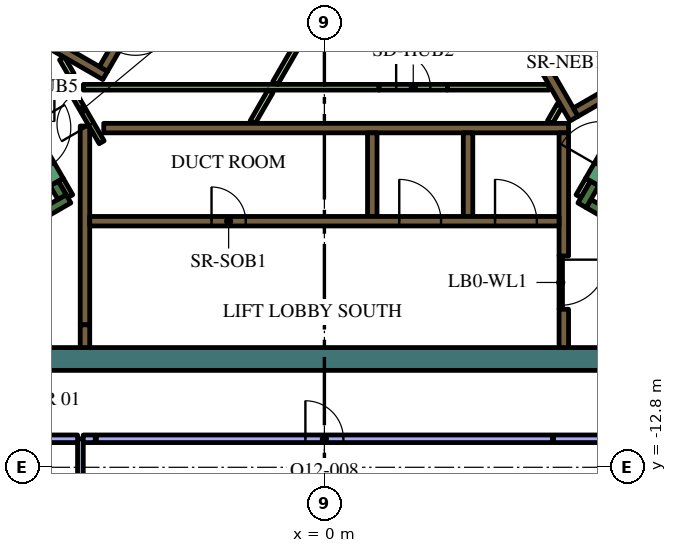
"""IFC4 building model, lengths in metres.
Left out: names, types, materials, properties, quantities, classifications, styles, units other than length and angle.
Written with IfcOpenShell. Run it as: python <this file> out.ifc"""

import sys

from ifc_helpers import new_model, si_unit, direction, frame, frame_2d, origin, place, context, subcontext, project, spatial, polyline, rectangle, outline, extrude, element, fill, save


model = new_model("IFC4")
c1 = context("Model", 3, precision=1e-05, world=origin(), true_north=direction((0.0, 1.0)))
c2 = subcontext(c1, "Body", "Model", "MODEL_VIEW")
j1 = project(units=[si_unit("LENGTHUNIT", "METRE"), si_unit("PLANEANGLEUNIT", "RADIAN")], contexts=[c1])
p1 = place(None, origin())
s1 = spatial("IfcSite", under=j1, at=p1, CompositionType="ELEMENT")
p2 = place(p1, origin())
s2 = spatial("IfcBuilding", under=s1, at=p2, CompositionType="ELEMENT")
p3 = place(p2, frame((0.0, 0.0, 288.0)))
s3 = spatial("IfcBuildingStorey", under=s2, at=p3, CompositionType="ELEMENT", Elevation=288.0)
p4 = place(p3, origin())
e1 = element("IfcWall", 1, at=p4, inside=s3, PredefinedType="SOLIDWALL", context=c2, shape_type="SweptSolid", body=[
    extrude(outline(polyline([(-15.502, -6.35), (-4.912, 11.992), (-4.393, 11.692), (-10.815, 0.569), (-10.84, 0.583), (-10.84, 0.583), (-10.84, 0.583), (-10.965, 0.367), (-10.965, 0.367), (-10.965, 0.367), (-10.94, 0.352), (-11.033, 0.191), (-14.809, -6.35), (-15.156, -6.95), (-15.502, -6.35)])), origin(), (0.0, 0.0, 1.0), 4.2),
])
p5 = place(p3, frame((-10.556, -9.95, 0.0), z_axis=(0.0, 0.0, 1.0), x_axis=(1.0, 0.0, 0.0)))
e2 = element("IfcWall", 2, at=p5, inside=s3, PredefinedType="SOLIDWALL", context=c2, shape_type="SweptSolid", body=[
    extrude(rectangle(XDim=19.461, YDim=0.6, at=frame_2d((9.73, 0.0))), origin(), (0.0, 0.0, 1.0), 4.2),
])
p6 = place(p3, frame((12.84, -9.261, 0.0), z_axis=(0.0, 0.0, 1.0), x_axis=(-0.866013990052, 0.500019768644, 0.0)))
e3 = element("IfcWall", 3, at=p6, inside=s3, PredefinedType="SOLIDWALL", context=c2, shape_type="SweptSolid", body=[
    extrude(rectangle(XDim=6.8, YDim=0.25, at=frame_2d((3.4, 0.0))), origin(), (0.0, 0.0, 1.0), 4.2),
])
p7 = place(p3, frame((7.113, -5.33, 0.0), z_axis=(0.0, 0.0, 1.0), x_axis=(-0.499965889992, -0.866045096311, 0.0)))
e4 = element("IfcWall", 4, at=p7, inside=s3, PredefinedType="SOLIDWALL", context=c2, shape_type="SweptSolid", body=[
    extrude(rectangle(XDim=0.666, YDim=0.25, at=frame_2d((0.333, 0.0))), origin(), (0.0, 0.0, 1.0), 4.2),
])
p8 = place(p3, frame((-12.84, -9.261, 0.0), z_axis=(0.0, 0.0, 1.0), x_axis=(0.866016039709, 0.500016218704, 0.0)))
e5 = element("IfcWall", 5, at=p8, inside=s3, PredefinedType="SOLIDWALL", context=c2, shape_type="SweptSolid", body=[
    extrude(rectangle(XDim=7.05, YDim=0.25, at=frame_2d((3.525, 0.0))), origin(), (0.0, 0.0, 1.0), 4.2),
])
p9 = place(p3, frame((-6.905, -5.69, 0.0), z_axis=(0.0, 0.0, 1.0), x_axis=(-0.499993700073, 0.866029041019, 0.0)))
e6 = element("IfcWall", 6, at=p9, inside=s3, PredefinedType="SOLIDWALL", context=c2, shape_type="SweptSolid", body=[
    extrude(rectangle(XDim=0.416, YDim=0.25, at=frame_2d((0.208, 0.0))), origin(), (0.0, 0.0, 1.0), 4.2),
])
p10 = place(p3, frame((-5.806, -3.875, 0.0), z_axis=(0.0, 0.0, 1.0), x_axis=(1.0, 0.0, 0.0)))
e7 = element("IfcWall", 7, at=p10, inside=s3, PredefinedType="SOLIDWALL", context=c2, shape_type="SweptSolid", body=[
    extrude(rectangle(XDim=12.231, YDim=0.25, at=frame_2d((6.116, 0.0))), origin(), (0.0, 0.0, 1.0), 4.2),
])
p11 = place(p3, frame((6.3, -7.24, 0.0), z_axis=(0.0, 0.0, 1.0), x_axis=(0.0, 1.0, 0.0)))
e8 = element("IfcWall", 8, at=p11, inside=s3, PredefinedType="SOLIDWALL", context=c2, shape_type="SweptSolid", body=[
    extrude(rectangle(XDim=3.24, YDim=0.25, at=frame_2d((1.62, 0.0))), origin(), (0.0, 0.0, 1.0), 4.2),
])
p12 = place(p3, frame((6.3, -9.65, 0.0), z_axis=(0.0, 0.0, 1.0), x_axis=(0.0, 1.0, 0.0)))
e9 = element("IfcWall", 9, at=p12, inside=s3, PredefinedType="SOLIDWALL", context=c2, shape_type="SweptSolid", body=[
    extrude(rectangle(XDim=1.008, YDim=0.25, at=frame_2d((0.504, 0.0))), origin(), (0.0, 0.0, 1.0), 4.2),
])
for number, where, z_axis, x_axis in (
    (10, (3.78, -4.0, 0.0), (0.0, 0.0, 1.0), (0.0, -1.0, 0.0)),
    (11, (1.26, -4.0, 0.0), (0.0, 0.0, 1.0), (0.0, -1.0, 0.0)),
):
    element("IfcWall", number, at=place(p3, frame(where, z_axis=z_axis, x_axis=x_axis)), inside=s3, PredefinedType="SOLIDWALL", context=c2, shape_type="SweptSolid", body=[
        extrude(rectangle(XDim=2.2, YDim=0.25, at=frame_2d((1.1, 0.0))), origin(), (0.0, 0.0, 1.0), 4.2),
    ])
p13 = place(p3, frame((-6.3, -9.05, 0.0), z_axis=(0.0, 0.0, 1.0), x_axis=(0.0, 1.0, 0.0)))
e12 = element("IfcWall", 12, at=p13, inside=s3, PredefinedType="SOLIDWALL", context=c2, shape_type="SweptSolid", body=[
    extrude(rectangle(XDim=5.23, YDim=0.25, at=frame_2d((2.615, 0.0))), origin(), (0.0, 0.0, 1.0), 4.2),
])
p14 = place(p3, frame((-6.3, -9.052, 0.0), z_axis=(0.0, 0.0, 1.0), x_axis=(0.0, -1.0, 0.0)))
e13 = element("IfcWall", 13, at=p14, inside=s3, PredefinedType="SOLIDWALL", context=c2, shape_type="SweptSolid", body=[
    extrude(rectangle(XDim=0.598, YDim=0.25, at=frame_2d((0.299, 0.0))), origin(), (0.0, 0.0, 1.0), 4.2),
])
e14 = element("IfcWall", 14, at=p4, inside=s3, PredefinedType="SOLIDWALL", context=c2, shape_type="SweptSolid", body=[
    extrude(outline(polyline([(0.332, 6.925), (0.335, 6.925), (0.335, 6.925), (0.335, 6.925), (0.335, 7.075), (0.335, 7.075), (0.335, 7.075), (0.245, 7.075), (0.035, 7.439), (0.252, 7.564), (0.377, 7.348), (1.512, 5.382), (1.637, 5.165), (2.221, 4.153), (2.771, 3.199), (2.896, 2.983), (3.138, 2.564), (4.031, 1.017), (4.156, 0.801), (5.292, -1.165), (5.417, -1.382), (6.073, -2.519), (6.552, -3.348), (6.677, -3.564), (6.46, -3.689), (0.332, 6.925)])), origin(), (0.0, 0.0, 1.0), 4.2),
])
p15 = place(p3, frame((11.507, -0.631, 0.0), z_axis=(0.0, 0.0, 1.0), x_axis=(-0.866011447264, -0.500024172624, 0.0)))
e15 = element("IfcWall", 15, at=p15, inside=s3, PredefinedType="SOLIDWALL", context=c2, shape_type="SweptSolid", body=[
    extrude(rectangle(XDim=5.65, YDim=0.25, at=frame_2d((2.825, 0.0))), origin(), (0.0, 0.0, 1.0), 4.2),
])
p16 = place(p3, frame((-7.889, -1.265, 0.0), z_axis=(0.0, 0.0, 1.0), x_axis=(0.866057815567, -0.499943856944, 0.0)))
e16 = element("IfcWall", 16, at=p16, inside=s3, PredefinedType="SOLIDWALL", context=c2, shape_type="SweptSolid", body=[
    extrude(rectangle(XDim=2.45, YDim=0.25, at=frame_2d((1.225, 0.0))), origin(), (0.0, 0.0, 1.0), 4.2),
])
p17 = place(p3, frame((1.438, -2.8, 0.0), z_axis=(0.0, 0.0, 1.0), x_axis=(-1.0, 0.0, 0.0)))
e17 = element("IfcWall", 17, at=p17, inside=s3, PredefinedType="PARTITIONING", context=c2, shape_type="SweptSolid", body=[
    extrude(rectangle(XDim=7.781, YDim=0.15, at=frame_2d((3.891, 0.0))), origin(), (0.0, 0.0, 1.0), 3.55),
])
p18 = place(p3, frame((-1.418, -2.907, 0.0), z_axis=(0.0, 0.0, 1.0), x_axis=(-0.499978056798, -0.866038072327, 0.0)))
e18 = element("IfcWall", 18, at=p18, inside=s3, PredefinedType="PARTITIONING", context=c2, shape_type="SweptSolid", body=[
    extrude(rectangle(XDim=0.937, YDim=0.15, at=frame_2d((0.469, 0.0))), origin(), (0.0, 0.0, 1.0), 3.55),
])
for number, where, z_axis, x_axis in (
    (19, (-1.295, -2.693, 0.0), (0.0, 0.0, 1.0), (0.5, 0.866, 0.0)),
    (20, (3.238, -2.8, 0.0), (0.0, 0.0, 1.0), (1.0, 0.0, 0.0)),
):
    element("IfcWall", number, at=place(p3, frame(where, z_axis=z_axis, x_axis=x_axis)), inside=s3, PredefinedType="PARTITIONING", context=c2, shape_type="SweptSolid", body=[
        extrude(rectangle(XDim=2.672, YDim=0.15, at=frame_2d((1.336, 0.0))), origin(), (0.0, 0.0, 1.0), 3.55),
    ])
p19 = place(p3, frame((-6.653, -2.477, 0.0), z_axis=(0.0, 0.0, 1.0), x_axis=(-0.500002592159, 0.866023907196, 0.0)))
e21 = element("IfcWall", 21, at=p19, inside=s3, PredefinedType="PARTITIONING", context=c2, shape_type="SweptSolid", body=[
    extrude(rectangle(XDim=0.503, YDim=0.15, at=frame_2d((0.251, 0.0))), origin(), (0.0, 0.0, 1.0), 3.55),
])
p20 = place(p3, frame((-6.94, -5.23, 0.0), z_axis=(0.0, 0.0, 1.0), x_axis=(0.499834152157, -0.86612113491, 0.0)))
e22 = element("IfcWall", 22, at=p20, inside=s3, PredefinedType="PARTITIONING", context=c2, shape_type="SweptSolid", body=[
    extrude(rectangle(XDim=0.505, YDim=0.15, at=frame_2d((0.252, 0.0))), origin(), (0.0, 0.0, 1.0), 4.2),
])
p21 = place(p3, frame((6.688, -5.667, 0.0), z_axis=(0.0, 0.0, 1.0), x_axis=(0.499834152157, 0.86612113491, 0.0)))
e23 = element("IfcWall", 23, at=p21, inside=s3, PredefinedType="PARTITIONING", context=c2, shape_type="SweptSolid", body=[
    extrude(rectangle(XDim=0.505, YDim=0.15, at=frame_2d((0.252, 0.0))), origin(), (0.0, 0.0, 1.0), 3.55),
])
p22 = place(p3, frame((5.936, -3.718, 0.0), z_axis=(0.0, 0.0, 1.0), x_axis=(0.499890179513, 0.866088799389, 0.0)))
e24 = element("IfcWall", 24, at=p22, inside=s3, PredefinedType="PARTITIONING", context=c2, shape_type="SweptSolid", body=[
    extrude(rectangle(XDim=0.504, YDim=0.15, at=frame_2d((0.252, 0.0))), origin(), (0.0, 0.0, 1.0), 3.55),
])
p23 = place(p3, frame((-6.175, -6.325, 0.0), z_axis=(0.0, 0.0, 1.0), x_axis=(1.0, 0.0, 0.0)))
e25 = element("IfcWall", 25, at=p23, inside=s3, PredefinedType="SOLIDWALL", context=c2, shape_type="SweptSolid", body=[
    extrude(rectangle(XDim=12.35, YDim=0.25, at=frame_2d((6.175, 0.0))), origin(), (0.0, 0.0, 1.0), 4.2),
])
p24 = place(p23, frame((3.205, 0.0, 0.0)))
e26 = element("IfcOpeningElement", 26, at=p24, cuts=e25, PredefinedType="OPENING", context=c2, shape_type="SweptSolid", body=[
    extrude(rectangle(XDim=0.9, YDim=2.1, at=frame_2d((0.45, 1.05))), frame((0.0, 0.135, 0.0), z_axis=(0.0, -1.0, 0.0), x_axis=(1.0, 0.0, 0.0)), (0.0, 0.0, 1.0), 0.27),
])
p25 = place(p23, frame((8.145, 0.0, 0.0)))
e27 = element("IfcOpeningElement", 27, at=p25, cuts=e25, PredefinedType="OPENING", context=c2, shape_type="SweptSolid", body=[
    extrude(rectangle(XDim=1.1, YDim=2.1, at=frame_2d((0.55, 1.05))), frame((0.0, 0.135, 0.0), z_axis=(0.0, -1.0, 0.0), x_axis=(1.0, 0.0, 0.0)), (0.0, 0.0, 1.0), 0.27),
])
p26 = place(p23, frame((10.665, 0.0, 0.0)))
e28 = element("IfcOpeningElement", 28, at=p26, cuts=e25, PredefinedType="OPENING", context=c2, shape_type="SweptSolid", body=[
    extrude(rectangle(XDim=1.1, YDim=2.1, at=frame_2d((0.55, 1.05))), frame((0.0, 0.135, 0.0), z_axis=(0.0, -1.0, 0.0), x_axis=(1.0, 0.0, 0.0)), (0.0, 0.0, 1.0), 0.27),
])
p27 = place(p3, frame((8.565, -2.185, 0.0), z_axis=(0.0, 0.0, 1.0), x_axis=(-0.499997954832, 0.866026584559, 0.0)))
e29 = element("IfcWall", 29, at=p27, inside=s3, PredefinedType="SOLIDWALL", context=c2, shape_type="SweptSolid", body=[
    extrude(rectangle(XDim=12.35, YDim=0.25, at=frame_2d((6.175, 0.0))), origin(), (0.0, 0.0, 1.0), 4.2),
])
p28 = place(p27, frame((0.685, 0.0, 0.0)))
e30 = element("IfcOpeningElement", 30, at=p28, cuts=e29, PredefinedType="OPENING", context=c2, shape_type="SweptSolid", body=[
    extrude(rectangle(XDim=0.9, YDim=2.1, at=frame_2d((0.45, 1.05))), frame((0.0, 0.135, 0.0), z_axis=(0.0, -1.0, 0.0), x_axis=(1.0, 0.0, 0.0)), (0.0, 0.0, 1.0), 0.27),
])
p29 = place(p27, frame((3.105, 0.0, 0.0)))
e31 = element("IfcOpeningElement", 31, at=p29, cuts=e29, PredefinedType="OPENING", context=c2, shape_type="SweptSolid", body=[
    extrude(rectangle(XDim=1.1, YDim=2.1, at=frame_2d((0.55, 1.05))), frame((0.0, 0.135, 0.0), z_axis=(0.0, -1.0, 0.0), x_axis=(1.0, 0.0, 0.0)), (0.0, 0.0, 1.0), 0.27),
])
p30 = place(p27, frame((5.625, 0.0, 0.0)))
e32 = element("IfcOpeningElement", 32, at=p30, cuts=e29, PredefinedType="OPENING", context=c2, shape_type="SweptSolid", body=[
    extrude(rectangle(XDim=1.1, YDim=2.1, at=frame_2d((0.55, 1.05))), frame((0.0, 0.135, 0.0), z_axis=(0.0, -1.0, 0.0), x_axis=(1.0, 0.0, 0.0)), (0.0, 0.0, 1.0), 0.27),
])
p31 = place(p27, frame((8.145, 0.0, 0.0)))
e33 = element("IfcOpeningElement", 33, at=p31, cuts=e29, PredefinedType="OPENING", context=c2, shape_type="SweptSolid", body=[
    extrude(rectangle(XDim=1.1, YDim=2.1, at=frame_2d((0.55, 1.05))), frame((0.0, 0.135, 0.0), z_axis=(0.0, -1.0, 0.0), x_axis=(1.0, 0.0, 0.0)), (0.0, 0.0, 1.0), 0.27),
])
p32 = place(p27, frame((10.665, 0.0, 0.0)))
e34 = element("IfcOpeningElement", 34, at=p32, cuts=e29, PredefinedType="OPENING", context=c2, shape_type="SweptSolid", body=[
    extrude(rectangle(XDim=1.1, YDim=2.1, at=frame_2d((0.55, 1.05))), frame((0.0, 0.135, 0.0), z_axis=(0.0, -1.0, 0.0), x_axis=(1.0, 0.0, 0.0)), (0.0, 0.0, 1.0), 0.27),
])
p33 = place(p3, frame((-0.898, 6.194, 0.0), z_axis=(0.0, 0.0, 1.0), x_axis=(-0.499996202215, -0.866027596426, 0.0)))
e35 = element("IfcWall", 35, at=p33, inside=s3, PredefinedType="SOLIDWALL", context=c2, shape_type="SweptSolid", body=[
    extrude(rectangle(XDim=9.83, YDim=0.25, at=frame_2d((4.915, 0.0))), origin(), (0.0, 0.0, 1.0), 4.2),
])
p34 = place(p33, frame((0.585, 0.0, 0.0)))
e36 = element("IfcOpeningElement", 36, at=p34, cuts=e35, PredefinedType="OPENING", context=c2, shape_type="SweptSolid", body=[
    extrude(rectangle(XDim=1.1, YDim=2.1, at=frame_2d((0.55, 1.05))), frame((0.0, 0.135, 0.0), z_axis=(0.0, -1.0, 0.0), x_axis=(1.0, 0.0, 0.0)), (0.0, 0.0, 1.0), 0.27),
])
p35 = place(p33, frame((3.105, 0.0, 0.0)))
e37 = element("IfcOpeningElement", 37, at=p35, cuts=e35, PredefinedType="OPENING", context=c2, shape_type="SweptSolid", body=[
    extrude(rectangle(XDim=1.1, YDim=2.1, at=frame_2d((0.55, 1.05))), frame((0.0, 0.135, 0.0), z_axis=(0.0, -1.0, 0.0), x_axis=(1.0, 0.0, 0.0)), (0.0, 0.0, 1.0), 0.27),
])
p36 = place(p33, frame((5.625, 0.0, 0.0)))
e38 = element("IfcOpeningElement", 38, at=p36, cuts=e35, PredefinedType="OPENING", context=c2, shape_type="SweptSolid", body=[
    extrude(rectangle(XDim=1.1, YDim=2.1, at=frame_2d((0.55, 1.05))), frame((0.0, 0.135, 0.0), z_axis=(0.0, -1.0, 0.0), x_axis=(1.0, 0.0, 0.0)), (0.0, 0.0, 1.0), 0.27),
])
p37 = place(p33, frame((8.145, 0.0, 0.0)))
e39 = element("IfcOpeningElement", 39, at=p37, cuts=e35, PredefinedType="OPENING", context=c2, shape_type="SweptSolid", body=[
    extrude(rectangle(XDim=1.1, YDim=2.1, at=frame_2d((0.55, 1.05))), frame((0.0, 0.135, 0.0), z_axis=(0.0, -1.0, 0.0), x_axis=(1.0, 0.0, 0.0)), (0.0, 0.0, 1.0), 0.27),
])
p38 = place(p3, frame((7.048, -5.292, 0.0), z_axis=(0.0, 0.0, 1.0), x_axis=(0.49994051562, 0.866059744384, 0.0)))
e40 = element("IfcWall", 40, at=p38, inside=s3, PredefinedType="SOLIDWALL", context=c2, shape_type="SweptSolid", body=[
    extrude(rectangle(XDim=2.1, YDim=0.4, at=frame_2d((1.05, 0.0))), origin(), (0.0, 0.0, 1.0), 4.2),
])
p39 = place(p38, frame((0.45, 0.0, 0.0)))
e41 = element("IfcOpeningElement", 41, at=p39, cuts=e40, PredefinedType="OPENING", context=c2, shape_type="SweptSolid", body=[
    extrude(rectangle(XDim=1.2, YDim=2.1, at=frame_2d((0.6, 1.05))), frame((0.0, 0.21, 0.0), z_axis=(0.0, -1.0, 0.0), x_axis=(1.0, 0.0, 0.0)), (0.0, 0.0, 1.0), 0.42),
])
p40 = place(p3, frame((-8.098, -3.474, 0.0), z_axis=(0.0, 0.0, 1.0), x_axis=(0.49994051562, -0.866059744384, 0.0)))
e42 = element("IfcWall", 42, at=p40, inside=s3, PredefinedType="SOLIDWALL", context=c2, shape_type="SweptSolid", body=[
    extrude(rectangle(XDim=2.1, YDim=0.4, at=frame_2d((1.05, 0.0))), origin(), (0.0, 0.0, 1.0), 4.2),
])
p41 = place(p40, frame((0.45, 0.0, 0.0)))
e43 = element("IfcOpeningElement", 43, at=p41, cuts=e42, PredefinedType="OPENING", context=c2, shape_type="SweptSolid", body=[
    extrude(rectangle(XDim=1.2, YDim=2.1, at=frame_2d((0.6, 1.05))), frame((0.0, 0.21, 0.0), z_axis=(0.0, -1.0, 0.0), x_axis=(1.0, 0.0, 0.0)), (0.0, 0.0, 1.0), 0.42),
])
p42 = place(p3, frame((-5.861, -4.248, 0.0), z_axis=(0.0, 0.0, 1.0), x_axis=(-0.500043646338, 0.866000203093, 0.0)))
e44 = element("IfcWall", 44, at=p42, inside=s3, PredefinedType="PARTITIONING", context=c2, shape_type="SweptSolid", body=[
    extrude(rectangle(XDim=1.93, YDim=0.15, at=frame_2d((0.965, 0.0))), origin(), (0.0, 0.0, 1.0), 4.2),
])
p43 = place(p42, frame((0.55, 0.0, 0.0)))
e45 = element("IfcOpeningElement", 45, at=p43, cuts=e44, PredefinedType="OPENING", context=c2, shape_type="SweptSolid", body=[
    extrude(rectangle(XDim=0.9, YDim=2.1, at=frame_2d((0.45, 1.05))), frame((0.0, 0.085, 0.0), z_axis=(0.0, -1.0, 0.0), x_axis=(1.0, 0.0, 0.0)), (0.0, 0.0, 1.0), 0.17),
])
p44 = place(p3, frame((6.22, -7.237, 0.0), z_axis=(0.0, 0.0, 1.0), x_axis=(0.0, -1.0, 0.0)))
e46 = element("IfcWall", 46, at=p44, inside=s3, PredefinedType="PARTITIONING", context=c2, shape_type="SweptSolid", body=[
    extrude(rectangle(XDim=1.4, YDim=0.09, at=frame_2d((0.7, 0.0))), origin(), (0.0, 0.0, 1.0), 3.55),
])
p45 = place(p44, frame((0.1, 0.0, 0.0)))
e47 = element("IfcOpeningElement", 47, at=p45, cuts=e46, PredefinedType="OPENING", context=c2, shape_type="SweptSolid", body=[
    extrude(rectangle(XDim=1.2, YDim=2.1, at=frame_2d((0.6, 1.05))), frame((0.0, 0.055, 0.0), z_axis=(0.0, -1.0, 0.0), x_axis=(1.0, 0.0, 0.0)), (0.0, 0.0, 1.0), 0.11),
])
p46 = place(p3, frame((1.438, -2.8, 0.0), z_axis=(0.0, 0.0, 1.0), x_axis=(1.0, 0.0, 0.0)))
e48 = element("IfcWall", 48, at=p46, inside=s3, PredefinedType="PARTITIONING", context=c2, shape_type="SweptSolid", body=[
    extrude(rectangle(XDim=1.8, YDim=0.15, at=frame_2d((0.9, 0.0))), origin(), (0.0, 0.0, 1.0), 3.55),
])
p47 = place(p46, frame((0.45, 0.0, 0.0)))
e49 = element("IfcOpeningElement", 49, at=p47, cuts=e48, PredefinedType="OPENING", context=c2, shape_type="SweptSolid", body=[
    extrude(rectangle(XDim=0.9, YDim=2.1, at=frame_2d((0.45, 1.05))), frame((0.0, 0.085, 0.0), z_axis=(0.0, -1.0, 0.0), x_axis=(1.0, 0.0, 0.0)), (0.0, 0.0, 1.0), 0.17),
])
p48 = place(p3, frame((-6.655, -2.8, 0.0), z_axis=(0.0, 0.0, 1.0), x_axis=(-1.0, 0.0, 0.0)))
e50 = element("IfcWall", 50, at=p48, inside=s3, PredefinedType="PARTITIONING", context=c2, shape_type="SweptSolid", body=[
    extrude(rectangle(XDim=1.8, YDim=0.15, at=frame_2d((0.9, 0.0))), origin(), (0.0, 0.0, 1.0), 3.55),
])
p49 = place(p48, frame((0.45, 0.0, 0.0)))
e51 = element("IfcOpeningElement", 51, at=p49, cuts=e50, PredefinedType="OPENING", context=c2, shape_type="SweptSolid", body=[
    extrude(rectangle(XDim=0.9, YDim=2.1, at=frame_2d((0.45, 1.05))), frame((0.0, 0.085, 0.0), z_axis=(0.0, -1.0, 0.0), x_axis=(1.0, 0.0, 0.0)), (0.0, 0.0, 1.0), 0.17),
])
p50 = place(p3, frame((-6.42, -15.021, 0.0), z_axis=(0.0, 0.0, 1.0), x_axis=(0.0, 1.0, 0.0)))
e52 = element("IfcWall", 52, at=p50, inside=s3, PredefinedType="PARTITIONING", context=c2, shape_type="SweptSolid", body=[
    extrude(rectangle(XDim=2.971, YDim=0.15, at=frame_2d((1.485, 0.0))), origin(), (0.0, 0.0, 1.0), 3.55),
])
p51 = place(p50, frame((1.071, 0.0, 0.0)))
e53 = element("IfcOpeningElement", 53, at=p51, cuts=e52, PredefinedType="OPENING", context=c2, shape_type="SweptSolid", body=[
    extrude(rectangle(XDim=0.9, YDim=2.1, at=frame_2d((0.45, 1.05))), frame((0.0, 0.085, 0.0), z_axis=(0.0, -1.0, 0.0), x_axis=(1.0, 0.0, 0.0)), (0.0, 0.0, 1.0), 0.17),
])
p52 = place(p3, frame((-13.799, -12.05, 0.0), z_axis=(0.0, 0.0, 1.0), x_axis=(1.0, 0.0, 0.0)))
e54 = element("IfcWall", 54, at=p52, inside=s3, PredefinedType="PARTITIONING", context=c2, shape_type="SweptSolid", body=[
    extrude(rectangle(XDim=7.303, YDim=0.2, at=frame_2d((3.652, 0.0))), origin(), (0.0, 0.0, 1.0), 3.55),
])
p53 = place(p3, frame((-6.0, -12.05, 0.0), z_axis=(0.0, 0.0, 1.0), x_axis=(1.0, 0.0, 0.0)))
e55 = element("IfcWall", 55, at=p53, inside=s3, PredefinedType="PARTITIONING", context=c2, shape_type="SweptSolid", body=[
    extrude(rectangle(XDim=12.0, YDim=0.2, at=frame_2d((6.0, 0.0))), origin(), (0.0, 0.0, 1.0), 3.55),
])
p54 = place(p53, frame((5.5, 0.0, 0.0)))
e56 = element("IfcOpeningElement", 56, at=p54, cuts=e55, PredefinedType="OPENING", context=c2, shape_type="SweptSolid", body=[
    extrude(rectangle(XDim=1.0, YDim=2.1, at=frame_2d((0.5, 1.05))), frame((0.0, 0.11, 0.0), z_axis=(0.0, -1.0, 0.0), x_axis=(1.0, 0.0, 0.0)), (0.0, 0.0, 1.0), 0.22),
])
p55 = place(p3, frame((-6.345, -12.05, 0.0), z_axis=(0.0, 0.0, 1.0), x_axis=(1.0, 0.0, 0.0)))
e57 = element("IfcWall", 57, at=p55, inside=s3, PredefinedType="PARTITIONING", context=c2, shape_type="SweptSolid", body=[
    extrude(rectangle(XDim=0.315, YDim=0.2, at=frame_2d((0.158, 0.0))), origin(), (0.0, 0.0, 1.0), 3.55),
])
p56 = place(p3, frame((6.03, -12.05, 0.0), z_axis=(0.0, 0.0, 1.0), x_axis=(1.0, 0.0, 0.0)))
e58 = element("IfcWall", 58, at=p56, inside=s3, PredefinedType="PARTITIONING", context=c2, shape_type="SweptSolid", body=[
    extrude(rectangle(XDim=8.259, YDim=0.2, at=frame_2d((4.13, 0.0))), origin(), (0.0, 0.0, 1.0), 3.55),
])
p57 = place(p24, origin())
e59 = element("IfcDoor", 59, at=p57, inside=s3, OperationType="SINGLE_SWING_LEFT", PredefinedType="DOOR", context=c2, shape_type="SweptSolid", body=[
    extrude(rectangle(XDim=0.9, YDim=2.1, at=frame_2d((0.45, 1.05))), frame((0.0, 0.025, 0.0), z_axis=(0.0, -1.0, 0.0), x_axis=(1.0, 0.0, 0.0)), (0.0, 0.0, 1.0), 0.05),
])
fill(e26, e59)
p58 = place(p25, origin())
e60 = element("IfcDoor", 60, at=p58, inside=s3, OperationType="DOUBLE_DOOR_SLIDING", PredefinedType="DOOR", context=c2, shape_type="SweptSolid", body=[
    extrude(rectangle(XDim=1.1, YDim=2.1, at=frame_2d((0.55, 1.05))), frame((0.0, 0.025, 0.0), z_axis=(0.0, -1.0, 0.0), x_axis=(1.0, 0.0, 0.0)), (0.0, 0.0, 1.0), 0.05),
])
fill(e27, e60)
p59 = place(p26, origin())
e61 = element("IfcDoor", 61, at=p59, inside=s3, OperationType="DOUBLE_DOOR_SLIDING", PredefinedType="DOOR", context=c2, shape_type="SweptSolid", body=[
    extrude(rectangle(XDim=1.1, YDim=2.1, at=frame_2d((0.55, 1.05))), frame((0.0, 0.025, 0.0), z_axis=(0.0, -1.0, 0.0), x_axis=(1.0, 0.0, 0.0)), (0.0, 0.0, 1.0), 0.05),
])
fill(e28, e61)
p60 = place(p43, origin())
e62 = element("IfcDoor", 62, at=p60, inside=s3, OperationType="SINGLE_SWING_LEFT", PredefinedType="DOOR", context=c2, shape_type="SweptSolid", body=[
    extrude(rectangle(XDim=0.9, YDim=2.1, at=frame_2d((0.45, 1.05))), frame((0.0, 0.025, 0.0), z_axis=(0.0, -1.0, 0.0), x_axis=(1.0, 0.0, 0.0)), (0.0, 0.0, 1.0), 0.05),
])
fill(e45, e62)
p61 = place(p45, origin())
e63 = element("IfcDoor", 63, at=p61, inside=s3, OperationType="SINGLE_SWING_LEFT", PredefinedType="DOOR", context=c2, shape_type="SweptSolid", body=[
    extrude(rectangle(XDim=1.2, YDim=2.1, at=frame_2d((0.6, 1.05))), frame((0.0, 0.025, 0.0), z_axis=(0.0, -1.0, 0.0), x_axis=(1.0, 0.0, 0.0)), (0.0, 0.0, 1.0), 0.05),
])
fill(e47, e63)
p62 = place(p47, origin())
e64 = element("IfcDoor", 64, at=p62, inside=s3, OperationType="SINGLE_SWING_LEFT", PredefinedType="DOOR", context=c2, shape_type="SweptSolid", body=[
    extrude(rectangle(XDim=0.9, YDim=2.1, at=frame_2d((0.45, 1.05))), frame((0.0, 0.025, 0.0), z_axis=(0.0, -1.0, 0.0), x_axis=(1.0, 0.0, 0.0)), (0.0, 0.0, 1.0), 0.05),
])
fill(e49, e64)
p63 = place(p49, origin())
e65 = element("IfcDoor", 65, at=p63, inside=s3, OperationType="SINGLE_SWING_LEFT", PredefinedType="DOOR", context=c2, shape_type="SweptSolid", body=[
    extrude(rectangle(XDim=0.9, YDim=2.1, at=frame_2d((0.45, 1.05))), frame((0.0, 0.025, 0.0), z_axis=(0.0, -1.0, 0.0), x_axis=(1.0, 0.0, 0.0)), (0.0, 0.0, 1.0), 0.05),
])
fill(e51, e65)
p64 = place(p54, origin())
e66 = element("IfcDoor", 66, at=p64, inside=s3, OperationType="SINGLE_SWING_RIGHT", PredefinedType="DOOR", context=c2, shape_type="SweptSolid", body=[
    extrude(rectangle(XDim=1.0, YDim=2.1, at=frame_2d((0.5, 1.05))), frame((0.0, 0.025, 0.0), z_axis=(0.0, -1.0, 0.0), x_axis=(1.0, 0.0, 0.0)), (0.0, 0.0, 1.0), 0.05),
])
fill(e56, e66)
save(model, sys.argv[1])
